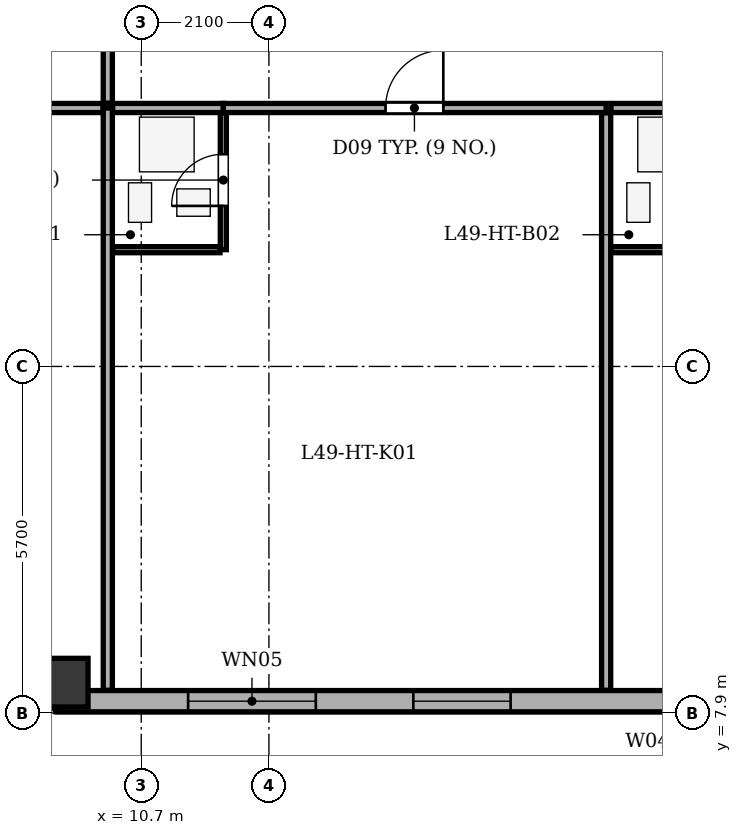
"""IFC4 building model, lengths in metres.
Left out: names, types, materials, properties, quantities, classifications, styles, units other than length and angle.
Written with IfcOpenShell. Run it as: python <this file> out.ifc"""

import sys

from ifc_helpers import new_model, si_unit, direction, frame, frame_2d, origin, origin_2d, place, context, subcontext, project, spatial, rectangle, extrude, element, fill, save


model = new_model("IFC4")
c1 = context("Model", 3, precision=1e-05, world=origin(), true_north=direction((0.0, 1.0)))
c2 = subcontext(c1, "Body", "Model", "MODEL_VIEW")
j1 = project(units=[si_unit("LENGTHUNIT", "METRE"), si_unit("PLANEANGLEUNIT", "RADIAN")], contexts=[c1])
p1 = place(None, origin())
s1 = spatial("IfcSite", under=j1, at=p1, CompositionType="ELEMENT")
p2 = place(p1, origin())
s2 = spatial("IfcBuilding", under=s1, at=p2, CompositionType="ELEMENT")
p3 = place(p2, frame((0.0, 0.0, 190.3)))
s3 = spatial("IfcBuildingStorey", under=s2, at=p3, CompositionType="ELEMENT", Elevation=190.3)
p4 = place(p3, frame((9.3, 8.4, 0.0), z_axis=(0.0, 0.0, 1.0), x_axis=(1.0, 0.0, 0.0)))
e1 = element("IfcColumn", 1, at=p4, inside=s3, PredefinedType="COLUMN", context=c2, shape_type="SweptSolid", body=[
    extrude(rectangle(XDim=0.8, YDim=1.05, at=origin_2d()), origin(), (0.0, 0.0, 1.0), 3.5),
])
p5 = place(p3, frame((44.3, 8.095, 0.0), z_axis=(0.0, 0.0, 1.0), x_axis=(-1.0, 0.0, 0.0)))
e2 = element("IfcWall", 2, at=p5, inside=s3, PredefinedType="STANDARD", context=c2, shape_type="SweptSolid", body=[
    extrude(rectangle(XDim=35.0, YDim=0.35, at=frame_2d((17.5, 0.0))), origin(), (0.0, 0.0, 1.0), 2.785),
])
p6 = place(p5, frame((19.6, 0.0, 0.0)))
e3 = element("IfcOpeningElement", 3, at=p6, cuts=e2, PredefinedType="OPENING", context=c2, shape_type="SweptSolid", body=[
    extrude(rectangle(XDim=1.0, YDim=2.02, at=frame_2d((0.5, 1.01))), frame((0.0, 0.185, 0.0), z_axis=(0.0, -1.0, 0.0), x_axis=(1.0, 0.0, 0.0)), (0.0, 0.0, 1.0), 0.37),
])
p7 = place(p5, frame((1.686, 0.0, 0.75)))
e4 = element("IfcOpeningElement", 4, at=p7, cuts=e2, PredefinedType="OPENING", context=c2, shape_type="SweptSolid", body=[
    extrude(rectangle(XDim=1.6, YDim=1.75, at=frame_2d((0.8, 0.875))), frame((0.0, 0.185, 0.0), z_axis=(0.0, -1.0, 0.0), x_axis=(1.0, 0.0, 0.0)), (0.0, 0.0, 1.0), 0.37),
])
p8 = place(p5, frame((4.843, 0.0, 0.75)))
e5 = element("IfcOpeningElement", 5, at=p8, cuts=e2, PredefinedType="OPENING", context=c2, shape_type="SweptSolid", body=[
    extrude(rectangle(XDim=1.6, YDim=1.75, at=frame_2d((0.8, 0.875))), frame((0.0, 0.185, 0.0), z_axis=(0.0, -1.0, 0.0), x_axis=(1.0, 0.0, 0.0)), (0.0, 0.0, 1.0), 0.37),
])
p9 = place(p5, frame((10.496, 0.0, 0.75)))
e6 = element("IfcOpeningElement", 6, at=p9, cuts=e2, PredefinedType="OPENING", context=c2, shape_type="SweptSolid", body=[
    extrude(rectangle(XDim=1.6, YDim=1.75, at=frame_2d((0.8, 0.875))), frame((0.0, 0.185, 0.0), z_axis=(0.0, -1.0, 0.0), x_axis=(1.0, 0.0, 0.0)), (0.0, 0.0, 1.0), 0.37),
])
p10 = place(p5, frame((13.304, 0.0, 0.75)))
e7 = element("IfcOpeningElement", 7, at=p10, cuts=e2, PredefinedType="OPENING", context=c2, shape_type="SweptSolid", body=[
    extrude(rectangle(XDim=1.6, YDim=1.75, at=frame_2d((0.8, 0.875))), frame((0.0, 0.185, 0.0), z_axis=(0.0, -1.0, 0.0), x_axis=(1.0, 0.0, 0.0)), (0.0, 0.0, 1.0), 0.37),
])
p11 = place(p5, frame((27.525, 0.0, 0.75)))
e8 = element("IfcOpeningElement", 8, at=p11, cuts=e2, PredefinedType="OPENING", context=c2, shape_type="SweptSolid", body=[
    extrude(rectangle(XDim=1.6, YDim=1.75, at=frame_2d((0.8, 0.875))), frame((0.0, 0.185, 0.0), z_axis=(0.0, -1.0, 0.0), x_axis=(1.0, 0.0, 0.0)), (0.0, 0.0, 1.0), 0.37),
])
p12 = place(p5, frame((30.729, 0.0, 0.75)))
e9 = element("IfcOpeningElement", 9, at=p12, cuts=e2, PredefinedType="OPENING", context=c2, shape_type="SweptSolid", body=[
    extrude(rectangle(XDim=2.1, YDim=1.75, at=frame_2d((1.05, 0.875))), frame((0.0, 0.185, 0.0), z_axis=(0.0, -1.0, 0.0), x_axis=(1.0, 0.0, 0.0)), (0.0, 0.0, 1.0), 0.37),
])
p13 = place(p3, frame((9.3, 8.095, 0.0), z_axis=(0.0, 0.0, 1.0), x_axis=(-0.707106781187, 0.707106781187, 0.0)))
e10 = element("IfcWall", 10, at=p13, inside=s3, PredefinedType="STANDARD", context=c2, shape_type="SweptSolid", body=[
    extrude(rectangle(XDim=6.795, YDim=0.35, at=frame_2d((3.397, 0.0))), origin(), (0.0, 0.0, 1.0), 2.785),
])
p14 = place(p13, frame((2.698, 0.0, 0.75)))
e11 = element("IfcOpeningElement", 11, at=p14, cuts=e10, PredefinedType="OPENING", context=c2, shape_type="SweptSolid", body=[
    extrude(rectangle(XDim=1.4, YDim=1.65, at=frame_2d((0.7, 0.825))), frame((0.0, 0.185, 0.0), z_axis=(0.0, -1.0, 0.0), x_axis=(1.0, 0.0, 0.0)), (0.0, 0.0, 1.0), 0.37),
])
p15 = place(p3, frame((10.15, 8.275, 0.0), z_axis=(0.0, 0.0, 1.0), x_axis=(0.0, 1.0, 0.0)))
e12 = element("IfcWall", 12, at=p15, inside=s3, PredefinedType="PARTITIONING", context=c2, shape_type="SweptSolid", body=[
    extrude(rectangle(XDim=9.575, YDim=0.15, at=frame_2d((4.788, 0.0))), origin(), (0.0, 0.0, 1.0), 3.2),
])
p16 = place(p3, frame((10.23, 17.85, 0.0), z_axis=(0.0, 0.0, 1.0), x_axis=(1.0, 0.0, 0.0)))
e13 = element("IfcWall", 13, at=p16, inside=s3, PredefinedType="PARTITIONING", context=c2, shape_type="SweptSolid", body=[
    extrude(rectangle(XDim=1.82, YDim=0.15, at=frame_2d((0.91, 0.0))), origin(), (0.0, 0.0, 1.0), 3.2),
])
p17 = place(p3, frame((12.05, 17.85, 0.0), z_axis=(0.0, 0.0, 1.0), x_axis=(1.0, 0.0, 0.0)))
e14 = element("IfcWall", 14, at=p17, inside=s3, PredefinedType="PARTITIONING", context=c2, shape_type="SweptSolid", body=[
    extrude(rectangle(XDim=6.296, YDim=0.15, at=frame_2d((3.148, 0.0))), origin(), (0.0, 0.0, 1.0), 3.2),
])
p18 = place(p17, frame((2.668, 0.0, 0.0)))
e15 = element("IfcOpeningElement", 15, at=p18, cuts=e14, PredefinedType="OPENING", context=c2, shape_type="SweptSolid", body=[
    extrude(rectangle(XDim=0.95, YDim=2.1, at=frame_2d((0.475, 1.05))), frame((0.0, 0.085, 0.0), z_axis=(0.0, -1.0, 0.0), x_axis=(1.0, 0.0, 0.0)), (0.0, 0.0, 1.0), 0.17),
])
p19 = place(p3, frame((12.05, 15.52, 0.0), z_axis=(0.0, 0.0, 1.0), x_axis=(0.0, 1.0, 0.0)))
e16 = element("IfcWall", 16, at=p19, inside=s3, PredefinedType="PARTITIONING", context=c2, shape_type="SweptSolid", body=[
    extrude(rectangle(XDim=2.25, YDim=0.1, at=frame_2d((1.125, 0.0))), origin(), (0.0, 0.0, 1.0), 3.2),
])
p20 = place(p19, frame((0.72, 0.0, 0.0)))
e17 = element("IfcOpeningElement", 17, at=p20, cuts=e16, PredefinedType="OPENING", context=c2, shape_type="SweptSolid", body=[
    extrude(rectangle(XDim=0.85, YDim=2.05, at=frame_2d((0.425, 1.025))), frame((0.0, 0.06, 0.0), z_axis=(0.0, -1.0, 0.0), x_axis=(1.0, 0.0, 0.0)), (0.0, 0.0, 1.0), 0.12),
])
p21 = place(p3, frame((10.23, 15.52, 0.0), z_axis=(0.0, 0.0, 1.0), x_axis=(1.0, 0.0, 0.0)))
e18 = element("IfcWall", 18, at=p21, inside=s3, PredefinedType="PARTITIONING", context=c2, shape_type="SweptSolid", body=[
    extrude(rectangle(XDim=1.765, YDim=0.1, at=frame_2d((0.883, 0.0))), origin(), (0.0, 0.0, 1.0), 3.2),
])
p22 = place(p3, frame((18.346, 8.275, 0.0), z_axis=(0.0, 0.0, 1.0), x_axis=(0.0, 1.0, 0.0)))
e19 = element("IfcWall", 19, at=p22, inside=s3, PredefinedType="PARTITIONING", context=c2, shape_type="SweptSolid", body=[
    extrude(rectangle(XDim=9.495, YDim=0.15, at=frame_2d((4.748, 0.0))), origin(), (0.0, 0.0, 1.0), 3.2),
])
p23 = place(p3, frame((18.426, 17.85, 0.0), z_axis=(0.0, 0.0, 1.0), x_axis=(1.0, 0.0, 0.0)))
e20 = element("IfcWall", 20, at=p23, inside=s3, PredefinedType="PARTITIONING", context=c2, shape_type="SweptSolid", body=[
    extrude(rectangle(XDim=1.82, YDim=0.15, at=frame_2d((0.91, 0.0))), origin(), (0.0, 0.0, 1.0), 3.2),
])
p24 = place(p3, frame((18.426, 15.52, 0.0), z_axis=(0.0, 0.0, 1.0), x_axis=(1.0, 0.0, 0.0)))
e21 = element("IfcWall", 21, at=p24, inside=s3, PredefinedType="PARTITIONING", context=c2, shape_type="SweptSolid", body=[
    extrude(rectangle(XDim=1.765, YDim=0.1, at=frame_2d((0.882, 0.0))), origin(), (0.0, 0.0, 1.0), 3.2),
])
p25 = place(p3, frame((4.675, 17.85, 0.0), z_axis=(0.0, 0.0, 1.0), x_axis=(1.0, 0.0, 0.0)))
e22 = element("IfcWall", 22, at=p25, inside=s3, PredefinedType="PARTITIONING", context=c2, shape_type="SweptSolid", body=[
    extrude(rectangle(XDim=5.395, YDim=0.15, at=frame_2d((2.698, 0.0))), origin(), (0.0, 0.0, 1.0), 3.2),
])
p26 = place(p3, frame((10.15, 17.93, 0.0), z_axis=(0.0, 0.0, 1.0), x_axis=(0.0, 1.0, 0.0)))
e23 = element("IfcWall", 23, at=p26, inside=s3, PredefinedType="PARTITIONING", context=c2, shape_type="SweptSolid", body=[
    extrude(rectangle(XDim=18.54, YDim=0.15, at=frame_2d((9.27, 0.0))), origin(), (0.0, 0.0, 1.0), 3.2),
])
p27 = place(p26, frame((8.79, 0.0, 0.0)))
e24 = element("IfcOpeningElement", 24, at=p27, cuts=e23, PredefinedType="OPENING", context=c2, shape_type="SweptSolid", body=[
    extrude(rectangle(XDim=0.95, YDim=2.1, at=frame_2d((0.475, 1.05))), frame((0.0, 0.085, 0.0), z_axis=(0.0, -1.0, 0.0), x_axis=(1.0, 0.0, 0.0)), (0.0, 0.0, 1.0), 0.17),
])
p28 = place(p11, origin())
e25 = element("IfcWindow", 25, at=p28, inside=s3, PartitioningType="SINGLE_PANEL", PredefinedType="WINDOW", context=c2, shape_type="SweptSolid", body=[
    extrude(rectangle(XDim=1.6, YDim=1.75, at=frame_2d((0.8, 0.875))), frame((0.0, -0.01, 0.0), z_axis=(0.0, -1.0, 0.0), x_axis=(1.0, 0.0, 0.0)), (0.0, 0.0, 1.0), 0.06),
])
fill(e8, e25)
p29 = place(p12, origin())
e26 = element("IfcWindow", 26, at=p29, inside=s3, PartitioningType="SINGLE_PANEL", PredefinedType="WINDOW", context=c2, shape_type="SweptSolid", body=[
    extrude(rectangle(XDim=2.1, YDim=1.75, at=frame_2d((1.05, 0.875))), frame((0.0, -0.01, 0.0), z_axis=(0.0, -1.0, 0.0), x_axis=(1.0, 0.0, 0.0)), (0.0, 0.0, 1.0), 0.06),
])
fill(e9, e26)
p30 = place(p20, origin())
e27 = element("IfcDoor", 27, at=p30, inside=s3, OperationType="SINGLE_SWING_LEFT", PredefinedType="DOOR", context=c2, shape_type="SweptSolid", body=[
    extrude(rectangle(XDim=0.85, YDim=2.05, at=frame_2d((0.425, 1.025))), frame((0.0, 0.025, 0.0), z_axis=(0.0, -1.0, 0.0), x_axis=(1.0, 0.0, 0.0)), (0.0, 0.0, 1.0), 0.05),
])
fill(e17, e27)
p31 = place(p18, origin())
e28 = element("IfcDoor", 28, at=p31, inside=s3, OperationType="SINGLE_SWING_RIGHT", PredefinedType="DOOR", context=c2, shape_type="SweptSolid", body=[
    extrude(rectangle(XDim=0.95, YDim=2.1, at=frame_2d((0.475, 1.05))), frame((0.0, 0.025, 0.0), z_axis=(0.0, -1.0, 0.0), x_axis=(1.0, 0.0, 0.0)), (0.0, 0.0, 1.0), 0.05),
])
fill(e15, e28)
save(model, sys.argv[1])
